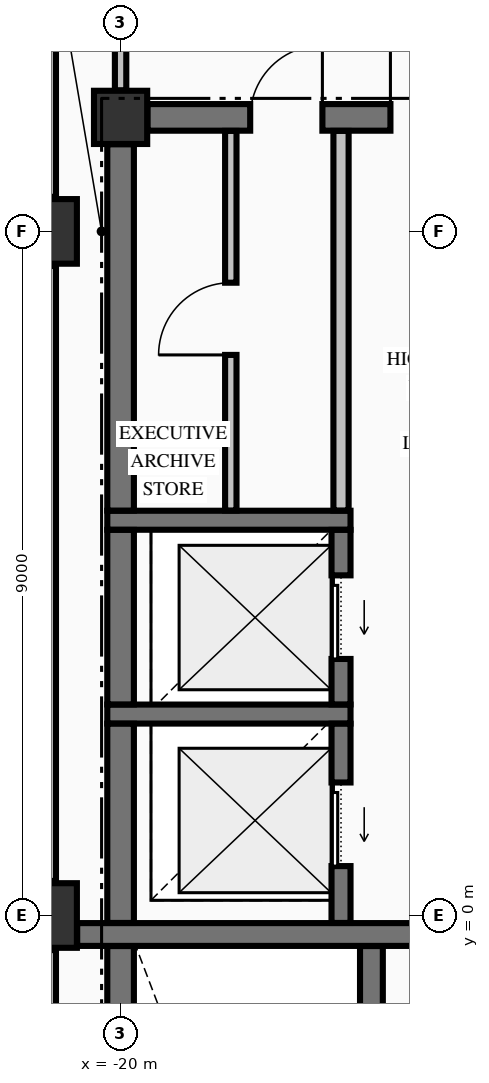
"""IFC4 building model, lengths in metres.
Left out: names, types, materials, properties, quantities, classifications, styles, units other than length and angle.
Written with IfcOpenShell. Run it as: python <this file> out.ifc"""

import sys

from ifc_helpers import new_model, si_unit, direction, frame, frame_2d, origin, origin_2d, place, context, subcontext, project, spatial, rectangle, extrude, element, fill, save


model = new_model("IFC4")
c1 = context("Model", 3, precision=1e-05, world=origin(), true_north=direction((0.0, 1.0)))
c2 = subcontext(c1, "Body", "Model", "MODEL_VIEW")
j1 = project(units=[si_unit("LENGTHUNIT", "METRE"), si_unit("PLANEANGLEUNIT", "RADIAN")], contexts=[c1])
p1 = place(None, origin())
s1 = spatial("IfcSite", under=j1, at=p1, CompositionType="ELEMENT")
p2 = place(p1, origin())
s2 = spatial("IfcBuilding", under=s1, at=p2, CompositionType="ELEMENT")
p3 = place(p2, frame((0.0, 0.0, 246.2)))
s3 = spatial("IfcBuildingStorey", under=s2, at=p3, CompositionType="ELEMENT", Elevation=246.2)
for number, where, z_axis, x_axis in (
    (1, (-21.0, 0.0, -0.25), (0.0, 0.0, 1.0), (1.0, 0.0, 0.0)),
    (2, (-21.0, 9.0, -0.25), (0.0, 0.0, 1.0), (1.0, 0.0, 0.0)),
):
    element("IfcColumn", number, at=place(p3, frame(where, z_axis=z_axis, x_axis=x_axis)), inside=s3, PredefinedType="COLUMN", context=c2, shape_type="SweptSolid", body=[
        extrude(rectangle(XDim=0.85, YDim=0.85, at=origin_2d()), origin(), (0.0, 0.0, 1.0), 3.055),
    ])
p4 = place(p3, frame((-20.0, 10.5, -0.25), z_axis=(0.0, 0.0, 1.0), x_axis=(1.0, 0.0, 0.0)))
e3 = element("IfcColumn", 3, at=p4, inside=s3, PredefinedType="COLUMN", context=c2, shape_type="SweptSolid", body=[
    extrude(rectangle(XDim=0.7, YDim=0.7, at=origin_2d()), origin(), (0.0, 0.0, 1.0), 3.055),
])
for number, where, z_axis, x_axis in (
    (4, (-21.0, -0.455, 0.0), (0.0, 0.0, 1.0), (0.0, -1.0, 0.0)),
    (5, (-21.0, 8.545, 0.0), (0.0, 0.0, 1.0), (0.0, -1.0, 0.0)),
    (6, (-21.0, 17.545, 0.0), (0.0, 0.0, 1.0), (0.0, -1.0, 0.0)),
):
    element("IfcWall", number, at=place(p3, frame(where, z_axis=z_axis, x_axis=x_axis)), inside=s3, PredefinedType="STANDARD", context=c2, shape_type="SweptSolid", body=[
        extrude(rectangle(XDim=8.09, YDim=0.3, at=frame_2d((4.045, 0.0))), origin(), (0.0, 0.0, 1.0), 2.197),
    ])
p5 = place(p3, frame((-20.571, -0.25, 0.0), z_axis=(0.0, 0.0, 1.0), x_axis=(1.0, 0.0, 0.0)))
e7 = element("IfcWall", 7, at=p5, inside=s3, PredefinedType="SHEAR", context=c2, shape_type="SweptSolid", body=[
    extrude(rectangle(XDim=9.217, YDim=0.3, at=frame_2d((4.608, 0.0))), origin(), (0.0, 0.0, 1.0), 2.805),
])
p6 = place(p5, frame((6.871, 0.0, 0.0)))
e8 = element("IfcOpeningElement", 8, at=p6, cuts=e7, PredefinedType="OPENING", context=c2, shape_type="SweptSolid", body=[
    extrude(rectangle(XDim=1.1, YDim=2.15, at=frame_2d((0.55, 1.075))), frame((0.0, 0.16, 0.0), z_axis=(0.0, -1.0, 0.0), x_axis=(1.0, 0.0, 0.0)), (0.0, 0.0, 1.0), 0.32),
])
for number, where, z_axis, x_axis in (
    (9, (-20.175, 2.65, 0.0), (0.0, 0.0, 1.0), (1.0, 0.0, 0.0)),
    (10, (-20.175, 5.2, 0.0), (0.0, 0.0, 1.0), (1.0, 0.0, 0.0)),
):
    element("IfcWall", number, at=place(p3, frame(where, z_axis=z_axis, x_axis=x_axis)), inside=s3, PredefinedType="SOLIDWALL", context=c2, shape_type="SweptSolid", body=[
        extrude(rectangle(XDim=3.2, YDim=0.25, at=frame_2d((1.6, 0.0))), origin(), (0.0, 0.0, 1.0), 2.805),
    ])
p7 = place(p3, frame((-19.646, 10.5, 0.0), z_axis=(0.0, 0.0, 1.0), x_axis=(1.0, 0.0, 0.0)))
e11 = element("IfcWall", 11, at=p7, inside=s3, PredefinedType="SHEAR", context=c2, shape_type="SweptSolid", body=[
    extrude(rectangle(XDim=4.946, YDim=0.35, at=frame_2d((2.473, 0.0))), origin(), (0.0, 0.0, 1.0), 2.805),
])
p8 = place(p7, frame((3.196, 0.0, 0.0)))
e12 = element("IfcOpeningElement", 12, at=p8, cuts=e11, PredefinedType="OPENING", context=c2, shape_type="SweptSolid", body=[
    extrude(rectangle(XDim=1.1, YDim=2.15, at=frame_2d((0.55, 1.075))), frame((0.0, 0.185, 0.0), z_axis=(0.0, -1.0, 0.0), x_axis=(1.0, 0.0, 0.0)), (0.0, 0.0, 1.0), 0.37),
])
p9 = place(p7, frame((1.351, 0.0, 0.0)))
e13 = element("IfcOpeningElement", 13, at=p9, cuts=e11, PredefinedType="OPENING", context=c2, shape_type="SweptSolid", body=[
    extrude(rectangle(XDim=0.95, YDim=2.15, at=frame_2d((0.475, 1.075))), frame((0.0, 0.185, 0.0), z_axis=(0.0, -1.0, 0.0), x_axis=(1.0, 0.0, 0.0)), (0.0, 0.0, 1.0), 0.37),
])
p10 = place(p3, frame((-20.0, -9.596, 0.0), z_axis=(0.0, 0.0, 1.0), x_axis=(0.0, 1.0, 0.0)))
e14 = element("IfcWall", 14, at=p10, inside=s3, PredefinedType="SHEAR", context=c2, shape_type="SweptSolid", body=[
    extrude(rectangle(XDim=9.194, YDim=0.35, at=frame_2d((4.597, 0.0))), origin(), (0.0, 0.0, 1.0), 2.805),
])
p11 = place(p3, frame((-20.0, -0.098, 0.0), z_axis=(0.0, 0.0, 1.0), x_axis=(0.0, 1.0, 0.0)))
e15 = element("IfcWall", 15, at=p11, inside=s3, PredefinedType="SHEAR", context=c2, shape_type="SweptSolid", body=[
    extrude(rectangle(XDim=2.621, YDim=0.35, at=frame_2d((1.311, 0.0))), origin(), (0.0, 0.0, 1.0), 2.805),
])
p12 = place(p3, frame((-20.0, 2.777, 0.0), z_axis=(0.0, 0.0, 1.0), x_axis=(0.0, 1.0, 0.0)))
e16 = element("IfcWall", 16, at=p12, inside=s3, PredefinedType="SHEAR", context=c2, shape_type="SweptSolid", body=[
    extrude(rectangle(XDim=2.296, YDim=0.35, at=frame_2d((1.148, 0.0))), origin(), (0.0, 0.0, 1.0), 2.805),
])
p13 = place(p3, frame((-20.0, 5.327, 0.0), z_axis=(0.0, 0.0, 1.0), x_axis=(0.0, 1.0, 0.0)))
e17 = element("IfcWall", 17, at=p13, inside=s3, PredefinedType="SHEAR", context=c2, shape_type="SweptSolid", body=[
    extrude(rectangle(XDim=4.819, YDim=0.35, at=frame_2d((2.41, 0.0))), origin(), (0.0, 0.0, 1.0), 2.805),
])
p14 = place(p3, frame((-17.1, -0.098, 0.0), z_axis=(0.0, 0.0, 1.0), x_axis=(0.0, 1.0, 0.0)))
e18 = element("IfcWall", 18, at=p14, inside=s3, PredefinedType="SOLIDWALL", context=c2, shape_type="SweptSolid", body=[
    extrude(rectangle(XDim=2.621, YDim=0.25, at=frame_2d((1.311, 0.0))), origin(), (0.0, 0.0, 1.0), 2.805),
])
p15 = place(p14, frame((0.748, 0.0, 0.0)))
e19 = element("IfcOpeningElement", 19, at=p15, cuts=e18, PredefinedType="OPENING", context=c2, shape_type="SweptSolid", body=[
    extrude(rectangle(XDim=1.1, YDim=2.2, at=frame_2d((0.55, 1.1))), frame((0.0, 0.135, 0.0), z_axis=(0.0, -1.0, 0.0), x_axis=(1.0, 0.0, 0.0)), (0.0, 0.0, 1.0), 0.27),
])
p16 = place(p3, frame((-17.1, 2.777, 0.0), z_axis=(0.0, 0.0, 1.0), x_axis=(0.0, 1.0, 0.0)))
e20 = element("IfcWall", 20, at=p16, inside=s3, PredefinedType="SOLIDWALL", context=c2, shape_type="SweptSolid", body=[
    extrude(rectangle(XDim=2.296, YDim=0.25, at=frame_2d((1.148, 0.0))), origin(), (0.0, 0.0, 1.0), 2.805),
])
p17 = place(p16, frame((0.598, 0.0, 0.0)))
e21 = element("IfcOpeningElement", 21, at=p17, cuts=e20, PredefinedType="OPENING", context=c2, shape_type="SweptSolid", body=[
    extrude(rectangle(XDim=1.1, YDim=2.2, at=frame_2d((0.55, 1.1))), frame((0.0, 0.135, 0.0), z_axis=(0.0, -1.0, 0.0), x_axis=(1.0, 0.0, 0.0)), (0.0, 0.0, 1.0), 0.27),
])
p18 = place(p3, frame((-16.7, -9.773, 0.0), z_axis=(0.0, 0.0, 1.0), x_axis=(0.0, 1.0, 0.0)))
e22 = element("IfcWall", 22, at=p18, inside=s3, PredefinedType="SHEAR", context=c2, shape_type="SweptSolid", body=[
    extrude(rectangle(XDim=9.371, YDim=0.3, at=frame_2d((4.686, 0.0))), origin(), (0.0, 0.0, 1.0), 2.805),
])
p19 = place(p3, frame((-20.0, 10.856, 0.0), z_axis=(0.0, 0.0, 1.0), x_axis=(0.0, 1.0, 0.0)))
e23 = element("IfcWall", 23, at=p19, inside=s3, PredefinedType="PARTITIONING", context=c2, shape_type="SweptSolid", body=[
    extrude(rectangle(XDim=1.616, YDim=0.15, at=frame_2d((0.808, 0.0))), origin(), (0.0, 0.0, 1.0), 2.395),
])
p20 = place(p3, frame((-18.55, 5.328, 0.0), z_axis=(0.0, 0.0, 1.0), x_axis=(0.0, 1.0, 0.0)))
e24 = element("IfcWall", 24, at=p20, inside=s3, PredefinedType="PARTITIONING", context=c2, shape_type="SweptSolid", body=[
    extrude(rectangle(XDim=4.994, YDim=0.15, at=frame_2d((2.497, 0.0))), origin(), (0.0, 0.0, 1.0), 2.805),
])
p21 = place(p20, frame((2.047, 0.0, 0.0)))
e25 = element("IfcOpeningElement", 25, at=p21, cuts=e24, PredefinedType="OPENING", context=c2, shape_type="SweptSolid", body=[
    extrude(rectangle(XDim=0.95, YDim=2.15, at=frame_2d((0.475, 1.075))), frame((0.0, 0.085, 0.0), z_axis=(0.0, -1.0, 0.0), x_axis=(1.0, 0.0, 0.0)), (0.0, 0.0, 1.0), 0.17),
])
p22 = place(p3, frame((-17.1, 5.328, 0.0), z_axis=(0.0, 0.0, 1.0), x_axis=(0.0, 1.0, 0.0)))
e26 = element("IfcWall", 26, at=p22, inside=s3, PredefinedType="PARTITIONING", context=c2, shape_type="SweptSolid", body=[
    extrude(rectangle(XDim=4.994, YDim=0.2, at=frame_2d((2.497, 0.0))), origin(), (0.0, 0.0, 1.0), 2.805),
])
p23 = place(p15, origin())
e27 = element("IfcDoor", 27, at=p23, inside=s3, OperationType="SLIDING_TO_LEFT", PredefinedType="DOOR", context=c2, shape_type="SweptSolid", body=[
    extrude(rectangle(XDim=1.1, YDim=2.2, at=frame_2d((0.55, 1.1))), frame((0.0, 0.025, 0.0), z_axis=(0.0, -1.0, 0.0), x_axis=(1.0, 0.0, 0.0)), (0.0, 0.0, 1.0), 0.05),
])
fill(e19, e27)
p24 = place(p17, origin())
e28 = element("IfcDoor", 28, at=p24, inside=s3, OperationType="SLIDING_TO_LEFT", PredefinedType="DOOR", context=c2, shape_type="SweptSolid", body=[
    extrude(rectangle(XDim=1.1, YDim=2.2, at=frame_2d((0.55, 1.1))), frame((0.0, 0.025, 0.0), z_axis=(0.0, -1.0, 0.0), x_axis=(1.0, 0.0, 0.0)), (0.0, 0.0, 1.0), 0.05),
])
fill(e21, e28)
p25 = place(p8, origin())
e29 = element("IfcDoor", 29, at=p25, inside=s3, OperationType="SINGLE_SWING_LEFT", PredefinedType="DOOR", context=c2, shape_type="SweptSolid", body=[
    extrude(rectangle(XDim=1.1, YDim=2.15, at=frame_2d((0.55, 1.075))), frame((0.0, 0.025, 0.0), z_axis=(0.0, -1.0, 0.0), x_axis=(1.0, 0.0, 0.0)), (0.0, 0.0, 1.0), 0.05),
])
fill(e12, e29)
p26 = place(p9, origin())
e30 = element("IfcDoor", 30, at=p26, inside=s3, OperationType="SINGLE_SWING_RIGHT", PredefinedType="DOOR", context=c2, shape_type="SweptSolid", body=[
    extrude(rectangle(XDim=0.95, YDim=2.15, at=frame_2d((0.475, 1.075))), frame((0.0, 0.025, 0.0), z_axis=(0.0, -1.0, 0.0), x_axis=(1.0, 0.0, 0.0)), (0.0, 0.0, 1.0), 0.05),
])
fill(e13, e30)
p27 = place(p21, origin())
e31 = element("IfcDoor", 31, at=p27, inside=s3, OperationType="SINGLE_SWING_LEFT", PredefinedType="DOOR", context=c2, shape_type="SweptSolid", body=[
    extrude(rectangle(XDim=0.95, YDim=2.15, at=frame_2d((0.475, 1.075))), frame((0.0, 0.025, 0.0), z_axis=(0.0, -1.0, 0.0), x_axis=(1.0, 0.0, 0.0)), (0.0, 0.0, 1.0), 0.05),
])
fill(e25, e31)
save(model, sys.argv[1])
